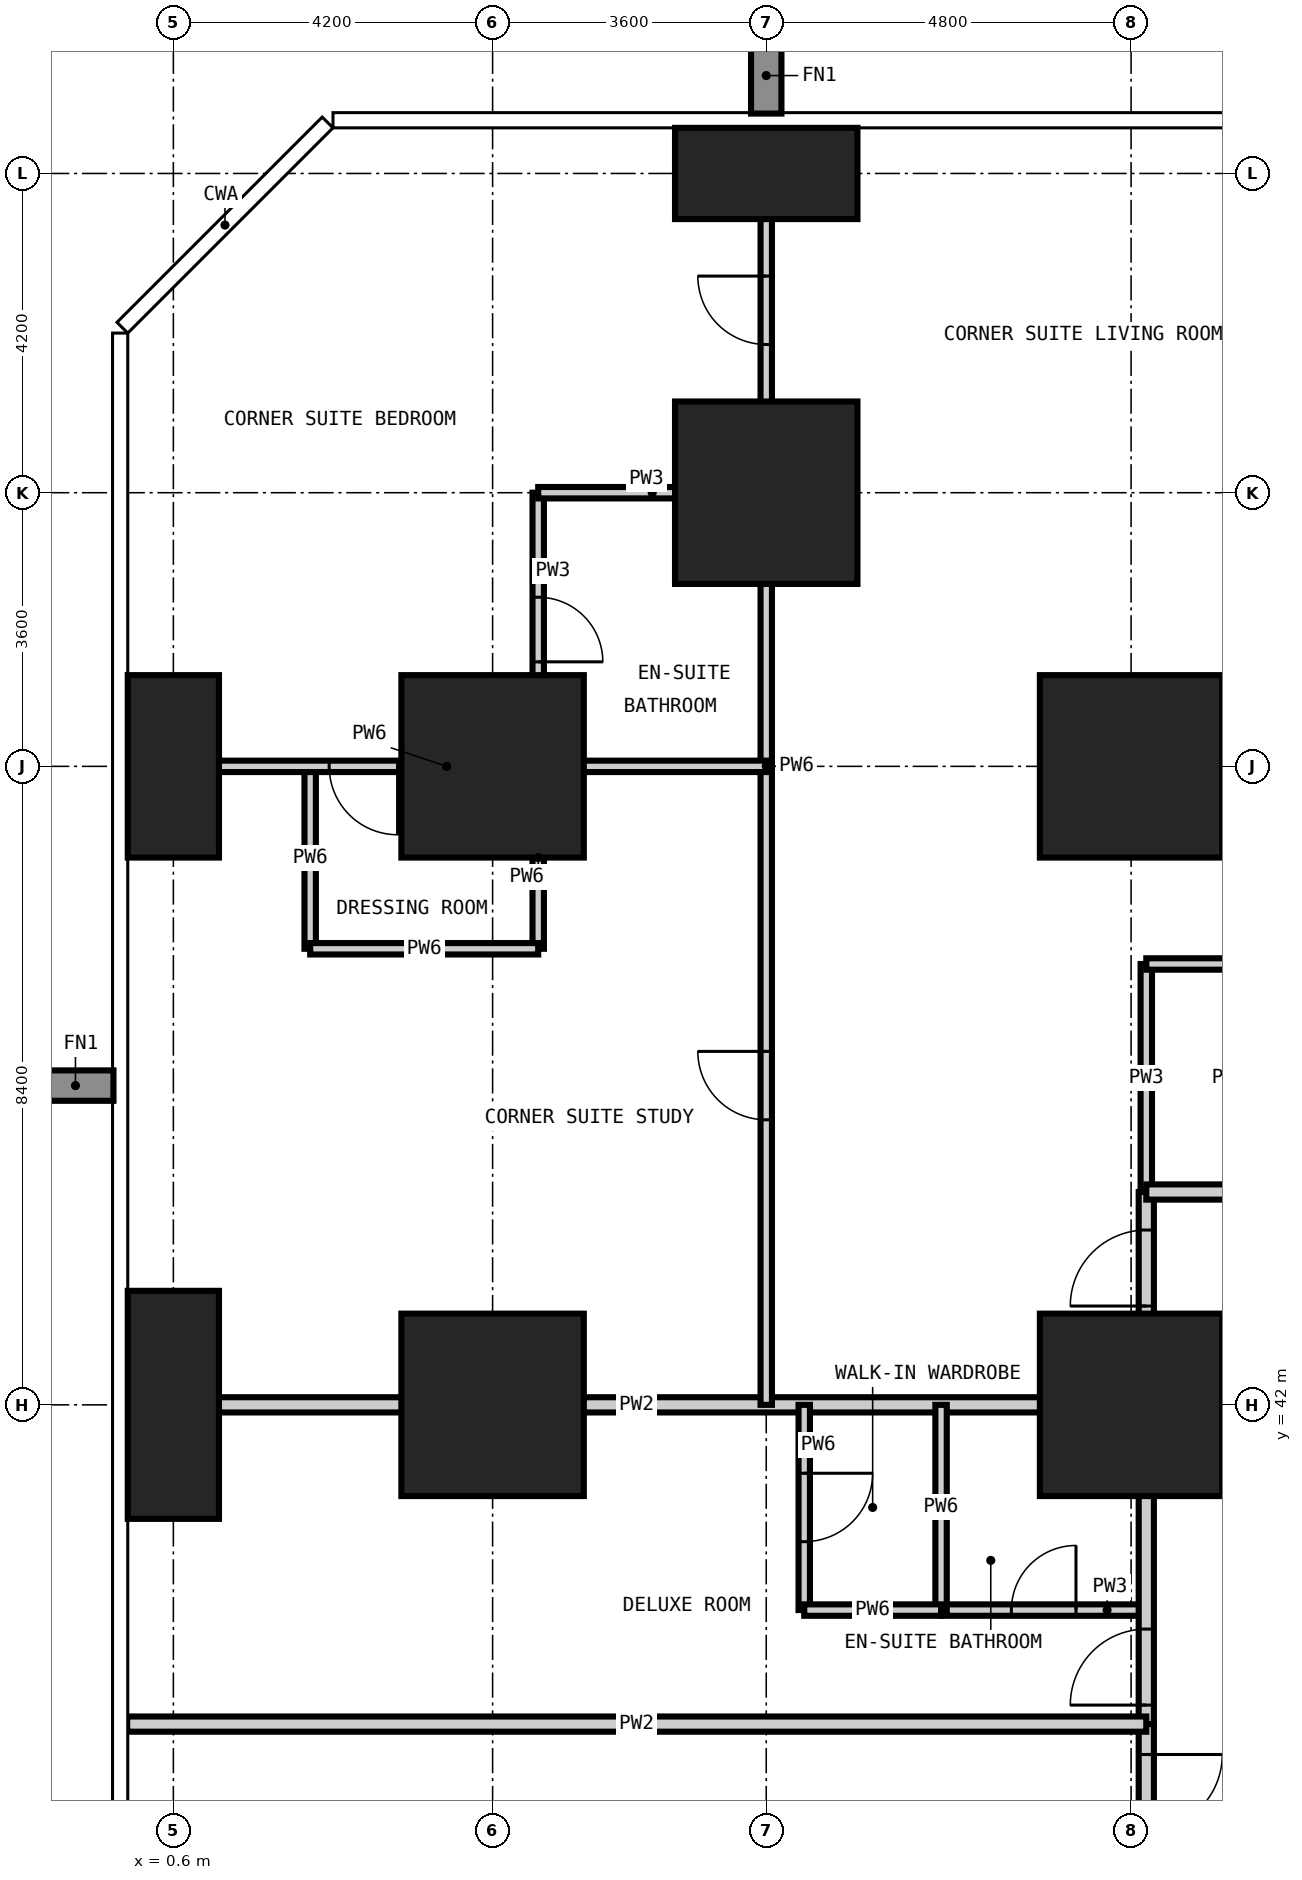
"""IFC4 building model, lengths in metres.
Left out: names, types, materials, properties, quantities, classifications, styles, units other than length and angle.
Written with IfcOpenShell. Run it as: python <this file> out.ifc"""

import sys

from ifc_helpers import new_model, si_unit, direction, frame, frame_2d, origin, origin_2d, place, context, subcontext, project, spatial, rectangle, extrude, element, fill, save


model = new_model("IFC4")
c1 = context("Model", 3, precision=1e-05, world=origin(), true_north=direction((0.0, 1.0)))
c2 = subcontext(c1, "Body", "Model", "MODEL_VIEW")
j1 = project(units=[si_unit("LENGTHUNIT", "METRE"), si_unit("PLANEANGLEUNIT", "RADIAN")], contexts=[c1])
p1 = place(None, origin())
s1 = spatial("IfcSite", under=j1, at=p1, CompositionType="ELEMENT")
p2 = place(p1, origin())
s2 = spatial("IfcBuilding", under=s1, at=p2, CompositionType="ELEMENT")
p3 = place(p2, frame((0.0, 0.0, 84.6)))
s3 = spatial("IfcBuildingStorey", under=s2, at=p3, CompositionType="ELEMENT", Elevation=84.6)
p4 = place(p3, frame((0.6, 42.0, -0.35), z_axis=(0.0, 0.0, 1.0), x_axis=(1.0, 0.0, 0.0)))
e1 = element("IfcColumn", 1, at=p4, inside=s3, PredefinedType="COLUMN", context=c2, shape_type="SweptSolid", body=[
    extrude(rectangle(XDim=1.2, YDim=3.0, at=origin_2d()), origin(), (0.0, 0.0, 1.0), 3.55),
])
p5 = place(p3, frame((0.6, 50.4, -0.35), z_axis=(0.0, 0.0, 1.0), x_axis=(1.0, 0.0, 0.0)))
e2 = element("IfcColumn", 2, at=p5, inside=s3, PredefinedType="COLUMN", context=c2, shape_type="SweptSolid", body=[
    extrude(rectangle(XDim=1.2, YDim=2.4, at=origin_2d()), origin(), (0.0, 0.0, 1.0), 3.55),
])
for number, where, z_axis, x_axis in (
    (3, (4.8, 42.0, -0.35), (0.0, 0.0, 1.0), (1.0, 0.0, 0.0)),
    (4, (4.8, 50.4, -0.35), (0.0, 0.0, 1.0), (1.0, 0.0, 0.0)),
    (5, (8.4, 54.0, -0.35), (0.0, 0.0, 1.0), (1.0, 0.0, 0.0)),
):
    element("IfcColumn", number, at=place(p3, frame(where, z_axis=z_axis, x_axis=x_axis)), inside=s3, PredefinedType="COLUMN", context=c2, shape_type="SweptSolid", body=[
        extrude(rectangle(XDim=2.4, YDim=2.4, at=origin_2d()), origin(), (0.0, 0.0, 1.0), 3.55),
    ])
p6 = place(p3, frame((8.4, 58.2, -0.35), z_axis=(0.0, 0.0, 1.0), x_axis=(1.0, 0.0, 0.0)))
e6 = element("IfcColumn", 6, at=p6, inside=s3, PredefinedType="COLUMN", context=c2, shape_type="SweptSolid", body=[
    extrude(rectangle(XDim=2.4, YDim=1.2, at=origin_2d()), origin(), (0.0, 0.0, 1.0), 3.55),
])
for number, where, z_axis, x_axis in (
    (7, (13.2, 42.0, -0.35), (0.0, 0.0, 1.0), (1.0, 0.0, 0.0)),
    (8, (13.2, 50.4, -0.35), (0.0, 0.0, 1.0), (1.0, 0.0, 0.0)),
):
    element("IfcColumn", number, at=place(p3, frame(where, z_axis=z_axis, x_axis=x_axis)), inside=s3, PredefinedType="COLUMN", context=c2, shape_type="SweptSolid", body=[
        extrude(rectangle(XDim=2.4, YDim=2.4, at=origin_2d()), origin(), (0.0, 0.0, 1.0), 3.55),
    ])
p7 = place(p3, frame((5.4, 50.4, 0.0), z_axis=(0.0, 0.0, 1.0), x_axis=(0.0, 1.0, 0.0)))
e9 = element("IfcWall", 9, at=p7, inside=s3, PredefinedType="PARTITIONING", context=c2, shape_type="SweptSolid", body=[
    extrude(rectangle(XDim=3.6, YDim=0.15, at=frame_2d((1.8, 0.0))), origin(), (0.0, 0.0, 1.0), 3.2),
])
p8 = place(p7, frame((1.375, 0.0, 0.0)))
e10 = element("IfcOpeningElement", 10, at=p8, cuts=e9, PredefinedType="OPENING", context=c2, shape_type="SweptSolid", body=[
    extrude(rectangle(XDim=0.85, YDim=2.1, at=frame_2d((0.425, 1.05))), frame((0.0, 0.085, 0.0), z_axis=(0.0, -1.0, 0.0), x_axis=(1.0, 0.0, 0.0)), (0.0, 0.0, 1.0), 0.17),
])
p9 = place(p3, frame((13.4, 44.8, 0.0), z_axis=(0.0, 0.0, 1.0), x_axis=(0.0, 1.0, 0.0)))
e11 = element("IfcWall", 11, at=p9, inside=s3, PredefinedType="PARTITIONING", context=c2, shape_type="SweptSolid", body=[
    extrude(rectangle(XDim=3.0, YDim=0.15, at=frame_2d((1.5, 0.0))), origin(), (0.0, 0.0, 1.0), 3.2),
])
p10 = place(p3, frame((10.7, 39.3, 0.0), z_axis=(0.0, 0.0, 1.0), x_axis=(1.0, 0.0, 0.0)))
e12 = element("IfcWall", 12, at=p10, inside=s3, PredefinedType="PARTITIONING", context=c2, shape_type="SweptSolid", body=[
    extrude(rectangle(XDim=2.7, YDim=0.15, at=frame_2d((1.35, 0.0))), origin(), (0.0, 0.0, 1.0), 3.2),
])
p11 = place(p10, frame((0.925, 0.0, 0.0)))
e13 = element("IfcOpeningElement", 13, at=p11, cuts=e12, PredefinedType="OPENING", context=c2, shape_type="SweptSolid", body=[
    extrude(rectangle(XDim=0.85, YDim=2.1, at=frame_2d((0.425, 1.05))), frame((0.0, 0.085, 0.0), z_axis=(0.0, -1.0, 0.0), x_axis=(1.0, 0.0, 0.0)), (0.0, 0.0, 1.0), 0.17),
])
p12 = place(p3, frame((13.4, 47.8, 0.0), z_axis=(0.0, 0.0, 1.0), x_axis=(1.0, 0.0, 0.0)))
e14 = element("IfcWall", 14, at=p12, inside=s3, PredefinedType="PARTITIONING", context=c2, shape_type="SweptSolid", body=[
    extrude(rectangle(XDim=3.4, YDim=0.15, at=frame_2d((1.7, 0.0))), origin(), (0.0, 0.0, 1.0), 3.2),
])
p13 = place(p12, frame((1.275, 0.0, 0.0)))
e15 = element("IfcOpeningElement", 15, at=p13, cuts=e14, PredefinedType="OPENING", context=c2, shape_type="SweptSolid", body=[
    extrude(rectangle(XDim=0.85, YDim=2.1, at=frame_2d((0.425, 1.05))), frame((0.0, 0.085, 0.0), z_axis=(0.0, -1.0, 0.0), x_axis=(1.0, 0.0, 0.0)), (0.0, 0.0, 1.0), 0.17),
])
p14 = place(p3, frame((5.4, 54.0, 0.0), z_axis=(0.0, 0.0, 1.0), x_axis=(1.0, 0.0, 0.0)))
e16 = element("IfcWall", 16, at=p14, inside=s3, PredefinedType="PARTITIONING", context=c2, shape_type="SweptSolid", body=[
    extrude(rectangle(XDim=3.0, YDim=0.15, at=frame_2d((1.5, 0.0))), origin(), (0.0, 0.0, 1.0), 3.2),
])
p15 = place(p3, frame((13.4, 37.8, 0.0), z_axis=(0.0, 0.0, 1.0), x_axis=(0.0, 1.0, 0.0)))
e17 = element("IfcWall", 17, at=p15, inside=s3, PredefinedType="PARTITIONING", context=c2, shape_type="SweptSolid", body=[
    extrude(rectangle(XDim=7.0, YDim=0.2, at=frame_2d((3.5, 0.0))), origin(), (0.0, 0.0, 1.0), 3.2),
])
p16 = place(p15, frame((0.25, 0.0, 0.0)))
e18 = element("IfcOpeningElement", 18, at=p16, cuts=e17, PredefinedType="OPENING", context=c2, shape_type="SweptSolid", body=[
    extrude(rectangle(XDim=1.0, YDim=2.2, at=frame_2d((0.5, 1.1))), frame((0.0, 0.11, 0.0), z_axis=(0.0, -1.0, 0.0), x_axis=(1.0, 0.0, 0.0)), (0.0, 0.0, 1.0), 0.22),
])
p17 = place(p15, frame((5.5, 0.0, 0.0)))
e19 = element("IfcOpeningElement", 19, at=p17, cuts=e17, PredefinedType="OPENING", context=c2, shape_type="SweptSolid", body=[
    extrude(rectangle(XDim=1.0, YDim=2.2, at=frame_2d((0.5, 1.1))), frame((0.0, 0.11, 0.0), z_axis=(0.0, -1.0, 0.0), x_axis=(1.0, 0.0, 0.0)), (0.0, 0.0, 1.0), 0.22),
])
p18 = place(p3, frame((13.4, 44.8, 0.0), z_axis=(0.0, 0.0, 1.0), x_axis=(1.0, 0.0, 0.0)))
e20 = element("IfcWall", 20, at=p18, inside=s3, PredefinedType="PARTITIONING", context=c2, shape_type="SweptSolid", body=[
    extrude(rectangle(XDim=32.6, YDim=0.2, at=frame_2d((16.3, 0.0))), origin(), (0.0, 0.0, 1.0), 3.2),
])
p19 = place(p18, frame((7.1, 0.0, 0.0)))
e21 = element("IfcOpeningElement", 21, at=p19, cuts=e20, PredefinedType="OPENING", context=c2, shape_type="SweptSolid", body=[
    extrude(rectangle(XDim=1.0, YDim=2.2, at=frame_2d((0.5, 1.1))), frame((0.0, 0.11, 0.0), z_axis=(0.0, -1.0, 0.0), x_axis=(1.0, 0.0, 0.0)), (0.0, 0.0, 1.0), 0.22),
])
p20 = place(p18, frame((15.5, 0.0, 0.0)))
e22 = element("IfcOpeningElement", 22, at=p20, cuts=e20, PredefinedType="OPENING", context=c2, shape_type="SweptSolid", body=[
    extrude(rectangle(XDim=1.0, YDim=2.2, at=frame_2d((0.5, 1.1))), frame((0.0, 0.11, 0.0), z_axis=(0.0, -1.0, 0.0), x_axis=(1.0, 0.0, 0.0)), (0.0, 0.0, 1.0), 0.22),
])
p21 = place(p18, frame((23.9, 0.0, 0.0)))
e23 = element("IfcOpeningElement", 23, at=p21, cuts=e20, PredefinedType="OPENING", context=c2, shape_type="SweptSolid", body=[
    extrude(rectangle(XDim=1.0, YDim=2.2, at=frame_2d((0.5, 1.1))), frame((0.0, 0.11, 0.0), z_axis=(0.0, -1.0, 0.0), x_axis=(1.0, 0.0, 0.0)), (0.0, 0.0, 1.0), 0.22),
])
p22 = place(p3, frame((13.4, 37.8, 0.0), z_axis=(0.0, 0.0, 1.0), x_axis=(0.0, -1.0, 0.0)))
e24 = element("IfcWall", 24, at=p22, inside=s3, PredefinedType="PARTITIONING", context=c2, shape_type="SweptSolid", body=[
    extrude(rectangle(XDim=1.8, YDim=0.2, at=frame_2d((0.9, 0.0))), origin(), (0.0, 0.0, 1.0), 3.2),
])
p23 = place(p22, frame((0.4, 0.0, 0.0)))
e25 = element("IfcOpeningElement", 25, at=p23, cuts=e24, PredefinedType="OPENING", context=c2, shape_type="SweptSolid", body=[
    extrude(rectangle(XDim=1.0, YDim=2.2, at=frame_2d((0.5, 1.1))), frame((0.0, 0.11, 0.0), z_axis=(0.0, -1.0, 0.0), x_axis=(1.0, 0.0, 0.0)), (0.0, 0.0, 1.0), 0.22),
])
for number, where, z_axis, x_axis in (
    (26, (-0.008, 37.8, 0.0), (0.0, 0.0, 1.0), (1.0, 0.0, 0.0)),
    (27, (-0.008, 42.0, 0.0), (0.0, 0.0, 1.0), (1.0, 0.0, 0.0)),
):
    element("IfcWall", number, at=place(p3, frame(where, z_axis=z_axis, x_axis=x_axis)), inside=s3, PredefinedType="PARTITIONING", context=c2, shape_type="SweptSolid", body=[
        extrude(rectangle(XDim=13.408, YDim=0.2, at=frame_2d((6.704, 0.0))), origin(), (0.0, 0.0, 1.0), 3.2),
    ])
for number, where, z_axis, x_axis in (
    (28, (2.4, 48.0, 0.0), (0.0, 0.0, 1.0), (0.0, 1.0, 0.0)),
    (29, (5.4, 48.0, 0.0), (0.0, 0.0, 1.0), (0.0, 1.0, 0.0)),
):
    element("IfcWall", number, at=place(p3, frame(where, z_axis=z_axis, x_axis=x_axis)), inside=s3, PredefinedType="PARTITIONING", context=c2, shape_type="SweptSolid", body=[
        extrude(rectangle(XDim=2.4, YDim=0.15, at=frame_2d((1.2, 0.0))), origin(), (0.0, 0.0, 1.0), 3.2),
    ])
p24 = place(p3, frame((8.4, 42.0, 0.0), z_axis=(0.0, 0.0, 1.0), x_axis=(0.0, 1.0, 0.0)))
e30 = element("IfcWall", 30, at=p24, inside=s3, PredefinedType="PARTITIONING", context=c2, shape_type="SweptSolid", body=[
    extrude(rectangle(XDim=16.808, YDim=0.15, at=frame_2d((8.404, 0.0))), origin(), (0.0, 0.0, 1.0), 3.2),
])
p25 = place(p24, frame((13.95, 0.0, 0.0)))
e31 = element("IfcOpeningElement", 31, at=p25, cuts=e30, PredefinedType="OPENING", context=c2, shape_type="SweptSolid", body=[
    extrude(rectangle(XDim=0.9, YDim=2.1, at=frame_2d((0.45, 1.05))), frame((0.0, 0.085, 0.0), z_axis=(0.0, -1.0, 0.0), x_axis=(1.0, 0.0, 0.0)), (0.0, 0.0, 1.0), 0.17),
])
p26 = place(p24, frame((3.75, 0.0, 0.0)))
e32 = element("IfcOpeningElement", 32, at=p26, cuts=e30, PredefinedType="OPENING", context=c2, shape_type="SweptSolid", body=[
    extrude(rectangle(XDim=0.9, YDim=2.1, at=frame_2d((0.45, 1.05))), frame((0.0, 0.085, 0.0), z_axis=(0.0, -1.0, 0.0), x_axis=(1.0, 0.0, 0.0)), (0.0, 0.0, 1.0), 0.17),
])
p27 = place(p3, frame((8.9, 39.3, 0.0), z_axis=(0.0, 0.0, 1.0), x_axis=(0.0, 1.0, 0.0)))
e33 = element("IfcWall", 33, at=p27, inside=s3, PredefinedType="PARTITIONING", context=c2, shape_type="SweptSolid", body=[
    extrude(rectangle(XDim=2.7, YDim=0.15, at=frame_2d((1.35, 0.0))), origin(), (0.0, 0.0, 1.0), 3.2),
])
p28 = place(p27, frame((0.9, 0.0, 0.0)))
e34 = element("IfcOpeningElement", 34, at=p28, cuts=e33, PredefinedType="OPENING", context=c2, shape_type="SweptSolid", body=[
    extrude(rectangle(XDim=0.9, YDim=2.1, at=frame_2d((0.45, 1.05))), frame((0.0, 0.085, 0.0), z_axis=(0.0, -1.0, 0.0), x_axis=(1.0, 0.0, 0.0)), (0.0, 0.0, 1.0), 0.17),
])
p29 = place(p3, frame((10.7, 39.3, 0.0), z_axis=(0.0, 0.0, 1.0), x_axis=(0.0, 1.0, 0.0)))
e35 = element("IfcWall", 35, at=p29, inside=s3, PredefinedType="PARTITIONING", context=c2, shape_type="SweptSolid", body=[
    extrude(rectangle(XDim=2.7, YDim=0.15, at=frame_2d((1.35, 0.0))), origin(), (0.0, 0.0, 1.0), 3.2),
])
p30 = place(p3, frame((8.9, 39.3, 0.0), z_axis=(0.0, 0.0, 1.0), x_axis=(1.0, 0.0, 0.0)))
e36 = element("IfcWall", 36, at=p30, inside=s3, PredefinedType="PARTITIONING", context=c2, shape_type="SweptSolid", body=[
    extrude(rectangle(XDim=1.8, YDim=0.15, at=frame_2d((0.9, 0.0))), origin(), (0.0, 0.0, 1.0), 3.2),
])
p31 = place(p3, frame((2.4, 48.0, 0.0), z_axis=(0.0, 0.0, 1.0), x_axis=(1.0, 0.0, 0.0)))
e37 = element("IfcWall", 37, at=p31, inside=s3, PredefinedType="PARTITIONING", context=c2, shape_type="SweptSolid", body=[
    extrude(rectangle(XDim=3.0, YDim=0.15, at=frame_2d((1.5, 0.0))), origin(), (0.0, 0.0, 1.0), 3.2),
])
p32 = place(p3, frame((-0.008, 50.4, 0.0), z_axis=(0.0, 0.0, 1.0), x_axis=(1.0, 0.0, 0.0)))
e38 = element("IfcWall", 38, at=p32, inside=s3, PredefinedType="PARTITIONING", context=c2, shape_type="SweptSolid", body=[
    extrude(rectangle(XDim=8.408, YDim=0.15, at=frame_2d((4.204, 0.0))), origin(), (0.0, 0.0, 1.0), 3.2),
])
p33 = place(p32, frame((2.658, 0.0, 0.0)))
e39 = element("IfcOpeningElement", 39, at=p33, cuts=e38, PredefinedType="OPENING", context=c2, shape_type="SweptSolid", body=[
    extrude(rectangle(XDim=0.9, YDim=2.1, at=frame_2d((0.45, 1.05))), frame((0.0, 0.085, 0.0), z_axis=(0.0, -1.0, 0.0), x_axis=(1.0, 0.0, 0.0)), (0.0, 0.0, 1.0), 0.17),
])
p34 = place(p23, origin())
e40 = element("IfcDoor", 40, at=p34, inside=s3, OperationType="SINGLE_SWING_LEFT", PredefinedType="DOOR", context=c2, shape_type="SweptSolid", body=[
    extrude(rectangle(XDim=1.0, YDim=2.2, at=frame_2d((0.5, 1.1))), frame((0.0, 0.025, 0.0), z_axis=(0.0, -1.0, 0.0), x_axis=(1.0, 0.0, 0.0)), (0.0, 0.0, 1.0), 0.05),
])
fill(e25, e40)
p35 = place(p16, origin())
e41 = element("IfcDoor", 41, at=p35, inside=s3, OperationType="SINGLE_SWING_LEFT", PredefinedType="DOOR", context=c2, shape_type="SweptSolid", body=[
    extrude(rectangle(XDim=1.0, YDim=2.2, at=frame_2d((0.5, 1.1))), frame((0.0, 0.025, 0.0), z_axis=(0.0, -1.0, 0.0), x_axis=(1.0, 0.0, 0.0)), (0.0, 0.0, 1.0), 0.05),
])
fill(e18, e41)
p36 = place(p11, origin())
e42 = element("IfcDoor", 42, at=p36, inside=s3, OperationType="SINGLE_SWING_RIGHT", PredefinedType="DOOR", context=c2, shape_type="SweptSolid", body=[
    extrude(rectangle(XDim=0.85, YDim=2.1, at=frame_2d((0.425, 1.05))), frame((0.0, 0.025, 0.0), z_axis=(0.0, -1.0, 0.0), x_axis=(1.0, 0.0, 0.0)), (0.0, 0.0, 1.0), 0.05),
])
fill(e13, e42)
p37 = place(p28, frame((0.9, 0.0, 0.0), z_axis=(0.0, 0.0, 1.0), x_axis=(-1.0, 0.0, 0.0)))
e43 = element("IfcDoor", 43, at=p37, inside=s3, OperationType="SINGLE_SWING_LEFT", PredefinedType="DOOR", context=c2, shape_type="SweptSolid", body=[
    extrude(rectangle(XDim=0.9, YDim=2.1, at=frame_2d((0.45, 1.05))), frame((0.0, 0.025, 0.0), z_axis=(0.0, -1.0, 0.0), x_axis=(1.0, 0.0, 0.0)), (0.0, 0.0, 1.0), 0.05),
])
fill(e34, e43)
p38 = place(p17, origin())
e44 = element("IfcDoor", 44, at=p38, inside=s3, OperationType="SINGLE_SWING_LEFT", PredefinedType="DOOR", context=c2, shape_type="SweptSolid", body=[
    extrude(rectangle(XDim=1.0, YDim=2.2, at=frame_2d((0.5, 1.1))), frame((0.0, 0.025, 0.0), z_axis=(0.0, -1.0, 0.0), x_axis=(1.0, 0.0, 0.0)), (0.0, 0.0, 1.0), 0.05),
])
fill(e19, e44)
p39 = place(p25, origin())
e45 = element("IfcDoor", 45, at=p39, inside=s3, OperationType="SINGLE_SWING_RIGHT", PredefinedType="DOOR", context=c2, shape_type="SweptSolid", body=[
    extrude(rectangle(XDim=0.9, YDim=2.1, at=frame_2d((0.45, 1.05))), frame((0.0, 0.025, 0.0), z_axis=(0.0, -1.0, 0.0), x_axis=(1.0, 0.0, 0.0)), (0.0, 0.0, 1.0), 0.05),
])
fill(e31, e45)
p40 = place(p8, frame((0.85, 0.0, 0.0), z_axis=(0.0, 0.0, 1.0), x_axis=(-1.0, 0.0, 0.0)))
e46 = element("IfcDoor", 46, at=p40, inside=s3, OperationType="SINGLE_SWING_RIGHT", PredefinedType="DOOR", context=c2, shape_type="SweptSolid", body=[
    extrude(rectangle(XDim=0.85, YDim=2.1, at=frame_2d((0.425, 1.05))), frame((0.0, 0.025, 0.0), z_axis=(0.0, -1.0, 0.0), x_axis=(1.0, 0.0, 0.0)), (0.0, 0.0, 1.0), 0.05),
])
fill(e10, e46)
p41 = place(p33, frame((0.9, 0.0, 0.0), z_axis=(0.0, 0.0, 1.0), x_axis=(-1.0, 0.0, 0.0)))
e47 = element("IfcDoor", 47, at=p41, inside=s3, OperationType="SINGLE_SWING_LEFT", PredefinedType="DOOR", context=c2, shape_type="SweptSolid", body=[
    extrude(rectangle(XDim=0.9, YDim=2.1, at=frame_2d((0.45, 1.05))), frame((0.0, 0.025, 0.0), z_axis=(0.0, -1.0, 0.0), x_axis=(1.0, 0.0, 0.0)), (0.0, 0.0, 1.0), 0.05),
])
fill(e39, e47)
p42 = place(p26, origin())
e48 = element("IfcDoor", 48, at=p42, inside=s3, OperationType="SINGLE_SWING_RIGHT", PredefinedType="DOOR", context=c2, shape_type="SweptSolid", body=[
    extrude(rectangle(XDim=0.9, YDim=2.1, at=frame_2d((0.45, 1.05))), frame((0.0, 0.025, 0.0), z_axis=(0.0, -1.0, 0.0), x_axis=(1.0, 0.0, 0.0)), (0.0, 0.0, 1.0), 0.05),
])
fill(e32, e48)
save(model, sys.argv[1])
